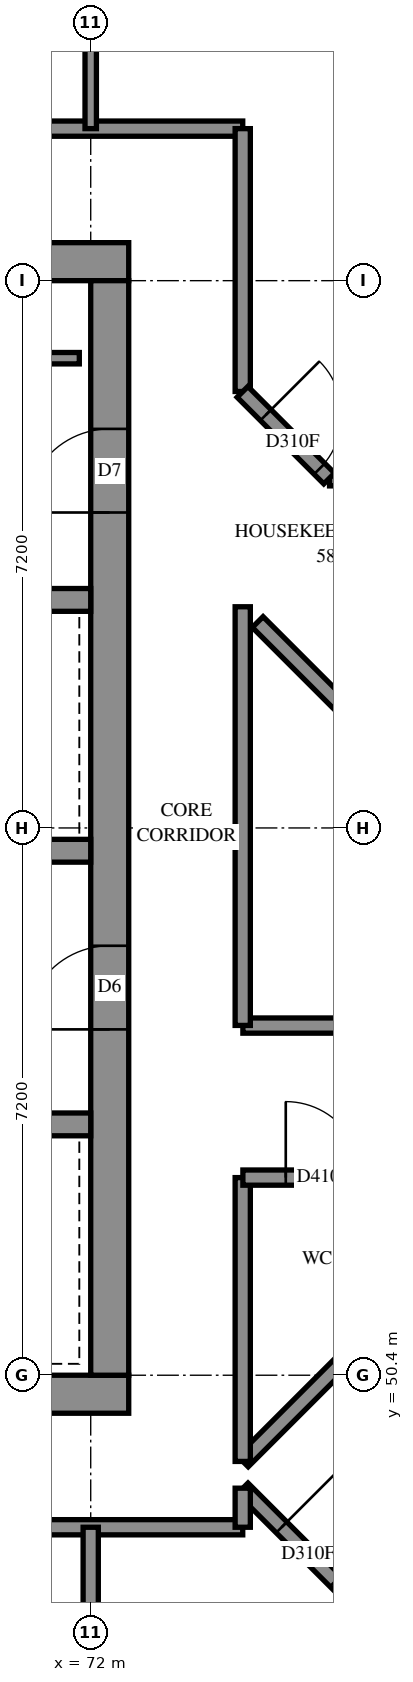
"""IFC4 building model, lengths in metres.
Left out: names, types, materials, properties, quantities, classifications, styles, units other than length and angle.
Written with IfcOpenShell. Run it as: python <this file> out.ifc"""

import sys

from ifc_helpers import new_model, si_unit, direction, frame, frame_2d, origin, place, context, subcontext, project, spatial, rectangle, extrude, element, fill, save


model = new_model("IFC4")
c1 = context("Model", 3, precision=1e-05, world=origin(), true_north=direction((0.0, 1.0)))
c2 = subcontext(c1, "Body", "Model", "MODEL_VIEW")
j1 = project(units=[si_unit("LENGTHUNIT", "METRE"), si_unit("PLANEANGLEUNIT", "RADIAN")], contexts=[c1])
p1 = place(None, origin())
s1 = spatial("IfcSite", under=j1, at=p1, CompositionType="ELEMENT")
p2 = place(p1, origin())
s2 = spatial("IfcBuilding", under=s1, at=p2, CompositionType="ELEMENT")
p3 = place(p2, frame((0.0, 0.0, 213.4)))
s3 = spatial("IfcBuildingStorey", under=s2, at=p3, CompositionType="ELEMENT", Elevation=213.4)
p4 = place(p3, frame((57.1, 50.15, -0.3), z_axis=(0.0, 0.0, 1.0), x_axis=(1.0, 0.0, 0.0)))
e1 = element("IfcWall", 1, at=p4, inside=s3, PredefinedType="SHEAR", context=c2, shape_type="SweptSolid", body=[
    extrude(rectangle(XDim=15.4, YDim=0.5, at=frame_2d((7.7, 0.0))), origin(), (0.0, 0.0, 1.0), 2.7),
])
p5 = place(p3, frame((57.1, 65.05, -0.3), z_axis=(0.0, 0.0, 1.0), x_axis=(1.0, 0.0, 0.0)))
e2 = element("IfcWall", 2, at=p5, inside=s3, PredefinedType="SHEAR", context=c2, shape_type="SweptSolid", body=[
    extrude(rectangle(XDim=15.4, YDim=0.5, at=frame_2d((7.7, 0.0))), origin(), (0.0, 0.0, 1.0), 2.7),
])
p6 = place(p5, frame((10.5, 0.0, 0.3)))
e3 = element("IfcOpeningElement", 3, at=p6, cuts=e2, PredefinedType="OPENING", context=c2, shape_type="SweptSolid", body=[
    extrude(rectangle(XDim=0.8, YDim=2.1, at=frame_2d((0.4, 1.05))), frame((0.0, 0.26, 0.0), z_axis=(0.0, -1.0, 0.0), x_axis=(1.0, 0.0, 0.0)), (0.0, 0.0, 1.0), 0.52),
])
p7 = place(p3, frame((72.25, 50.4, -0.3), z_axis=(0.0, 0.0, 1.0), x_axis=(0.0, 1.0, 0.0)))
e4 = element("IfcWall", 4, at=p7, inside=s3, PredefinedType="SHEAR", context=c2, shape_type="SweptSolid", body=[
    extrude(rectangle(XDim=14.4, YDim=0.5, at=frame_2d((7.2, 0.0))), origin(), (0.0, 0.0, 1.0), 2.7),
])
p8 = place(p7, frame((4.55, 0.0, 0.3)))
e5 = element("IfcOpeningElement", 5, at=p8, cuts=e4, PredefinedType="OPENING", context=c2, shape_type="SweptSolid", body=[
    extrude(rectangle(XDim=1.1, YDim=2.1, at=frame_2d((0.55, 1.05))), frame((0.0, 0.26, 0.0), z_axis=(0.0, -1.0, 0.0), x_axis=(1.0, 0.0, 0.0)), (0.0, 0.0, 1.0), 0.52),
])
p9 = place(p7, frame((11.35, 0.0, 0.3)))
e6 = element("IfcOpeningElement", 6, at=p9, cuts=e4, PredefinedType="OPENING", context=c2, shape_type="SweptSolid", body=[
    extrude(rectangle(XDim=1.1, YDim=2.1, at=frame_2d((0.55, 1.05))), frame((0.0, 0.26, 0.0), z_axis=(0.0, -1.0, 0.0), x_axis=(1.0, 0.0, 0.0)), (0.0, 0.0, 1.0), 0.52),
])
p10 = place(p3, frame((57.6, 53.7, 0.0), z_axis=(0.0, 0.0, 1.0), x_axis=(1.0, 0.0, 0.0)))
e7 = element("IfcWall", 7, at=p10, inside=s3, PredefinedType="SOLIDWALL", context=c2, shape_type="SweptSolid", body=[
    extrude(rectangle(XDim=14.4, YDim=0.3, at=frame_2d((7.2, 0.0))), origin(), (0.0, 0.0, 1.0), 3.1),
])
p11 = place(p10, frame((1.35, 0.0, 0.0)))
e8 = element("IfcOpeningElement", 8, at=p11, cuts=e7, PredefinedType="OPENING", context=c2, shape_type="SweptSolid", body=[
    extrude(rectangle(XDim=0.9, YDim=2.1, at=frame_2d((0.45, 1.05))), frame((0.0, 0.16, 0.0), z_axis=(0.0, -1.0, 0.0), x_axis=(1.0, 0.0, 0.0)), (0.0, 0.0, 1.0), 0.32),
])
p12 = place(p10, frame((4.95, 0.0, 0.0)))
e9 = element("IfcOpeningElement", 9, at=p12, cuts=e7, PredefinedType="OPENING", context=c2, shape_type="SweptSolid", body=[
    extrude(rectangle(XDim=0.9, YDim=2.1, at=frame_2d((0.45, 1.05))), frame((0.0, 0.16, 0.0), z_axis=(0.0, -1.0, 0.0), x_axis=(1.0, 0.0, 0.0)), (0.0, 0.0, 1.0), 0.32),
])
p13 = place(p10, frame((8.55, 0.0, 0.0)))
e10 = element("IfcOpeningElement", 10, at=p13, cuts=e7, PredefinedType="OPENING", context=c2, shape_type="SweptSolid", body=[
    extrude(rectangle(XDim=0.9, YDim=2.1, at=frame_2d((0.45, 1.05))), frame((0.0, 0.16, 0.0), z_axis=(0.0, -1.0, 0.0), x_axis=(1.0, 0.0, 0.0)), (0.0, 0.0, 1.0), 0.32),
])
p14 = place(p10, frame((12.05, 0.0, 0.0)))
e11 = element("IfcOpeningElement", 11, at=p14, cuts=e7, PredefinedType="OPENING", context=c2, shape_type="SweptSolid", body=[
    extrude(rectangle(XDim=1.1, YDim=2.1, at=frame_2d((0.55, 1.05))), frame((0.0, 0.16, 0.0), z_axis=(0.0, -1.0, 0.0), x_axis=(1.0, 0.0, 0.0)), (0.0, 0.0, 1.0), 0.32),
])
p15 = place(p3, frame((57.6, 57.3, 0.0), z_axis=(0.0, 0.0, 1.0), x_axis=(1.0, 0.0, 0.0)))
e12 = element("IfcWall", 12, at=p15, inside=s3, PredefinedType="SOLIDWALL", context=c2, shape_type="SweptSolid", body=[
    extrude(rectangle(XDim=14.4, YDim=0.3, at=frame_2d((7.2, 0.0))), origin(), (0.0, 0.0, 1.0), 3.1),
])
p16 = place(p15, frame((1.25, 0.0, 0.0)))
e13 = element("IfcOpeningElement", 13, at=p16, cuts=e12, PredefinedType="OPENING", context=c2, shape_type="SweptSolid", body=[
    extrude(rectangle(XDim=1.1, YDim=2.1, at=frame_2d((0.55, 1.05))), frame((0.0, 0.16, 0.0), z_axis=(0.0, -1.0, 0.0), x_axis=(1.0, 0.0, 0.0)), (0.0, 0.0, 1.0), 0.32),
])
p17 = place(p15, frame((4.85, 0.0, 0.0)))
e14 = element("IfcOpeningElement", 14, at=p17, cuts=e12, PredefinedType="OPENING", context=c2, shape_type="SweptSolid", body=[
    extrude(rectangle(XDim=1.1, YDim=2.1, at=frame_2d((0.55, 1.05))), frame((0.0, 0.16, 0.0), z_axis=(0.0, -1.0, 0.0), x_axis=(1.0, 0.0, 0.0)), (0.0, 0.0, 1.0), 0.32),
])
p18 = place(p15, frame((8.45, 0.0, 0.0)))
e15 = element("IfcOpeningElement", 15, at=p18, cuts=e12, PredefinedType="OPENING", context=c2, shape_type="SweptSolid", body=[
    extrude(rectangle(XDim=1.1, YDim=2.1, at=frame_2d((0.55, 1.05))), frame((0.0, 0.16, 0.0), z_axis=(0.0, -1.0, 0.0), x_axis=(1.0, 0.0, 0.0)), (0.0, 0.0, 1.0), 0.32),
])
p19 = place(p15, frame((12.05, 0.0, 0.0)))
e16 = element("IfcOpeningElement", 16, at=p19, cuts=e12, PredefinedType="OPENING", context=c2, shape_type="SweptSolid", body=[
    extrude(rectangle(XDim=1.1, YDim=2.1, at=frame_2d((0.55, 1.05))), frame((0.0, 0.16, 0.0), z_axis=(0.0, -1.0, 0.0), x_axis=(1.0, 0.0, 0.0)), (0.0, 0.0, 1.0), 0.32),
])
p20 = place(p3, frame((64.8, 60.6, 0.0), z_axis=(0.0, 0.0, 1.0), x_axis=(1.0, 0.0, 0.0)))
e17 = element("IfcWall", 17, at=p20, inside=s3, PredefinedType="SOLIDWALL", context=c2, shape_type="SweptSolid", body=[
    extrude(rectangle(XDim=7.2, YDim=0.3, at=frame_2d((3.6, 0.0))), origin(), (0.0, 0.0, 1.0), 3.1),
])
p21 = place(p3, frame((64.95, 63.78, 0.0), z_axis=(0.0, 0.0, 1.0), x_axis=(1.0, 0.0, 0.0)))
e18 = element("IfcWall", 18, at=p21, inside=s3, PredefinedType="PARTITIONING", context=c2, shape_type="SweptSolid", body=[
    extrude(rectangle(XDim=6.9, YDim=0.15, at=frame_2d((3.45, 0.0))), origin(), (0.0, 0.0, 1.0), 3.1),
])
p22 = place(p3, frame((55.6, 48.4, 0.0), z_axis=(0.0, 0.0, 1.0), x_axis=(1.0, 0.0, 0.0)))
e19 = element("IfcWall", 19, at=p22, inside=s3, PredefinedType="PARTITIONING", context=c2, shape_type="SweptSolid", body=[
    extrude(rectangle(XDim=18.4, YDim=0.2, at=frame_2d((9.2, 0.0))), origin(), (0.0, 0.0, 1.0), 3.1),
])
p23 = place(p22, frame((5.862, 0.0, 0.0)))
e20 = element("IfcOpeningElement", 20, at=p23, cuts=e19, PredefinedType="OPENING", context=c2, shape_type="SweptSolid", body=[
    extrude(rectangle(XDim=1.0, YDim=2.1, at=frame_2d((0.5, 1.05))), frame((0.0, 0.11, 0.0), z_axis=(0.0, -1.0, 0.0), x_axis=(1.0, 0.0, 0.0)), (0.0, 0.0, 1.0), 0.22),
])
p24 = place(p22, frame((13.099, 0.0, 0.0)))
e21 = element("IfcOpeningElement", 21, at=p24, cuts=e19, PredefinedType="OPENING", context=c2, shape_type="SweptSolid", body=[
    extrude(rectangle(XDim=0.9, YDim=2.1, at=frame_2d((0.45, 1.05))), frame((0.0, 0.11, 0.0), z_axis=(0.0, -1.0, 0.0), x_axis=(1.0, 0.0, 0.0)), (0.0, 0.0, 1.0), 0.22),
])
p25 = place(p3, frame((55.6, 66.8, 0.0), z_axis=(0.0, 0.0, 1.0), x_axis=(1.0, 0.0, 0.0)))
e22 = element("IfcWall", 22, at=p25, inside=s3, PredefinedType="PARTITIONING", context=c2, shape_type="SweptSolid", body=[
    extrude(rectangle(XDim=18.4, YDim=0.2, at=frame_2d((9.2, 0.0))), origin(), (0.0, 0.0, 1.0), 3.1),
])
p26 = place(p25, frame((4.25, 0.0, 0.0)))
e23 = element("IfcOpeningElement", 23, at=p26, cuts=e22, PredefinedType="OPENING", context=c2, shape_type="SweptSolid", body=[
    extrude(rectangle(XDim=0.9, YDim=2.1, at=frame_2d((0.45, 1.05))), frame((0.0, 0.11, 0.0), z_axis=(0.0, -1.0, 0.0), x_axis=(1.0, 0.0, 0.0)), (0.0, 0.0, 1.0), 0.22),
])
p27 = place(p25, frame((7.974, 0.0, 0.0)))
e24 = element("IfcOpeningElement", 24, at=p27, cuts=e22, PredefinedType="OPENING", context=c2, shape_type="SweptSolid", body=[
    extrude(rectangle(XDim=1.0, YDim=2.1, at=frame_2d((0.5, 1.05))), frame((0.0, 0.11, 0.0), z_axis=(0.0, -1.0, 0.0), x_axis=(1.0, 0.0, 0.0)), (0.0, 0.0, 1.0), 0.22),
])
p28 = place(p25, frame((13.2, 0.0, 0.0)))
e25 = element("IfcOpeningElement", 25, at=p28, cuts=e22, PredefinedType="OPENING", context=c2, shape_type="SweptSolid", body=[
    extrude(rectangle(XDim=0.9, YDim=2.1, at=frame_2d((0.45, 1.05))), frame((0.0, 0.11, 0.0), z_axis=(0.0, -1.0, 0.0), x_axis=(1.0, 0.0, 0.0)), (0.0, 0.0, 1.0), 0.22),
])
p29 = place(p3, frame((73.999, 48.911, 0.0), z_axis=(0.0, 0.0, 1.0), x_axis=(0.7071067812, -0.7071067812, 0.0)))
e26 = element("IfcWall", 26, at=p29, inside=s3, PredefinedType="PARTITIONING", context=c2, shape_type="SweptSolid", body=[
    extrude(rectangle(XDim=5.745, YDim=0.2, at=frame_2d((2.872, 0.0))), origin(), (0.0, 0.0, 1.0), 3.1),
])
p30 = place(p29, frame((0.724, 0.0, 0.0)))
e27 = element("IfcOpeningElement", 27, at=p30, cuts=e26, PredefinedType="OPENING", context=c2, shape_type="SweptSolid", body=[
    extrude(rectangle(XDim=1.0, YDim=2.1, at=frame_2d((0.5, 1.05))), frame((0.0, 0.11, 0.0), z_axis=(0.0, -1.0, 0.0), x_axis=(1.0, 0.0, 0.0)), (0.0, 0.0, 1.0), 0.22),
])
p31 = place(p3, frame((74.002, 55.0, 0.0), z_axis=(0.0, 0.0, 1.0), x_axis=(1.0, 0.0, 0.0)))
e28 = element("IfcWall", 28, at=p31, inside=s3, PredefinedType="PARTITIONING", context=c2, shape_type="SweptSolid", body=[
    extrude(rectangle(XDim=5.508, YDim=0.2, at=frame_2d((2.754, 0.0))), origin(), (0.0, 0.0, 1.0), 3.1),
])
p32 = place(p31, frame((1.51, 0.0, 0.0)))
e29 = element("IfcOpeningElement", 29, at=p32, cuts=e28, PredefinedType="OPENING", context=c2, shape_type="SweptSolid", body=[
    extrude(rectangle(XDim=1.0, YDim=2.1, at=frame_2d((0.5, 1.05))), frame((0.0, 0.11, 0.0), z_axis=(0.0, -1.0, 0.0), x_axis=(1.0, 0.0, 0.0)), (0.0, 0.0, 1.0), 0.22),
])
p33 = place(p3, frame((74.0, 55.002, 0.0), z_axis=(0.0, 0.0, 1.0), x_axis=(0.0, 1.0, 0.0)))
e30 = element("IfcWall", 30, at=p33, inside=s3, PredefinedType="PARTITIONING", context=c2, shape_type="SweptSolid", body=[
    extrude(rectangle(XDim=5.508, YDim=0.2, at=frame_2d((2.754, 0.0))), origin(), (0.0, 0.0, 1.0), 3.1),
])
p34 = place(p3, frame((74.001, 49.267, 0.0), z_axis=(0.0, 0.0, 1.0), x_axis=(0.7071067812, 0.7071067812, 0.0)))
e31 = element("IfcWall", 31, at=p34, inside=s3, PredefinedType="PARTITIONING", context=c2, shape_type="SweptSolid", body=[
    extrude(rectangle(XDim=5.278, YDim=0.2, at=frame_2d((2.639, 0.0))), origin(), (0.0, 0.0, 1.0), 3.1),
])
p35 = place(p3, frame((72.0, 43.6, 0.0), z_axis=(0.0, 0.0, 1.0), x_axis=(0.0, 1.0, 0.0)))
e32 = element("IfcWall", 32, at=p35, inside=s3, PredefinedType="PARTITIONING", context=c2, shape_type="SweptSolid", body=[
    extrude(rectangle(XDim=4.8, YDim=0.2, at=frame_2d((2.4, 0.0))), origin(), (0.0, 0.0, 1.0), 3.1),
])
p36 = place(p3, frame((74.197, 60.309, 0.0), z_axis=(0.0, 0.0, 1.0), x_axis=(0.7071067812, -0.7071067812, 0.0)))
e33 = element("IfcWall", 33, at=p36, inside=s3, PredefinedType="PARTITIONING", context=c2, shape_type="SweptSolid", body=[
    extrude(rectangle(XDim=4.738, YDim=0.2, at=frame_2d((2.369, 0.0))), origin(), (0.0, 0.0, 1.0), 3.1),
])
p37 = place(p3, frame((75.142, 62.2, 0.0), z_axis=(0.0, 0.0, 1.0), x_axis=(1.0, 0.0, 0.0)))
e34 = element("IfcWall", 34, at=p37, inside=s3, PredefinedType="PARTITIONING", context=c2, shape_type="SweptSolid", body=[
    extrude(rectangle(XDim=4.058, YDim=0.2, at=frame_2d((2.029, 0.0))), origin(), (0.0, 0.0, 1.0), 3.1),
])
p38 = place(p37, frame((2.808, 0.0, 0.0)))
e35 = element("IfcOpeningElement", 35, at=p38, cuts=e34, PredefinedType="OPENING", context=c2, shape_type="SweptSolid", body=[
    extrude(rectangle(XDim=0.9, YDim=2.1, at=frame_2d((0.45, 1.05))), frame((0.0, 0.11, 0.0), z_axis=(0.0, -1.0, 0.0), x_axis=(1.0, 0.0, 0.0)), (0.0, 0.0, 1.0), 0.22),
])
p39 = place(p3, frame((74.0, 49.266, 0.0), z_axis=(0.0, 0.0, 1.0), x_axis=(0.0, 1.0, 0.0)))
e36 = element("IfcWall", 36, at=p39, inside=s3, PredefinedType="PARTITIONING", context=c2, shape_type="SweptSolid", body=[
    extrude(rectangle(XDim=3.734, YDim=0.2, at=frame_2d((1.867, 0.0))), origin(), (0.0, 0.0, 1.0), 3.1),
])
p40 = place(p3, frame((74.002, 53.0, 0.0), z_axis=(0.0, 0.0, 1.0), x_axis=(1.0, 0.0, 0.0)))
e37 = element("IfcWall", 37, at=p40, inside=s3, PredefinedType="PARTITIONING", context=c2, shape_type="SweptSolid", body=[
    extrude(rectangle(XDim=3.732, YDim=0.2, at=frame_2d((1.866, 0.0))), origin(), (0.0, 0.0, 1.0), 3.1),
])
p41 = place(p40, frame((0.564, 0.0, 0.0)))
e38 = element("IfcOpeningElement", 38, at=p41, cuts=e37, PredefinedType="OPENING", context=c2, shape_type="SweptSolid", body=[
    extrude(rectangle(XDim=1.0, YDim=2.1, at=frame_2d((0.5, 1.05))), frame((0.0, 0.11, 0.0), z_axis=(0.0, -1.0, 0.0), x_axis=(1.0, 0.0, 0.0)), (0.0, 0.0, 1.0), 0.22),
])
p42 = place(p3, frame((74.0, 63.342, 0.0), z_axis=(0.0, 0.0, 1.0), x_axis=(0.0, 1.0, 0.0)))
e39 = element("IfcWall", 39, at=p42, inside=s3, PredefinedType="PARTITIONING", context=c2, shape_type="SweptSolid", body=[
    extrude(rectangle(XDim=3.458, YDim=0.2, at=frame_2d((1.729, 0.0))), origin(), (0.0, 0.0, 1.0), 3.1),
])
p43 = place(p3, frame((72.0, 66.8, 0.0), z_axis=(0.0, 0.0, 1.0), x_axis=(0.0, 1.0, 0.0)))
e40 = element("IfcWall", 40, at=p43, inside=s3, PredefinedType="PARTITIONING", context=c2, shape_type="SweptSolid", body=[
    extrude(rectangle(XDim=2.4, YDim=0.15, at=frame_2d((1.2, 0.0))), origin(), (0.0, 0.0, 1.0), 3.1),
])
p44 = place(p3, frame((73.997, 63.337, 0.0), z_axis=(0.0, 0.0, 1.0), x_axis=(0.7071067812, -0.7071067812, 0.0)))
e41 = element("IfcWall", 41, at=p44, inside=s3, PredefinedType="PARTITIONING", context=c2, shape_type="SweptSolid", body=[
    extrude(rectangle(XDim=1.612, YDim=0.2, at=frame_2d((0.806, 0.0))), origin(), (0.0, 0.0, 1.0), 3.1),
])
p45 = place(p44, frame((0.432, 0.0, 0.0)))
e42 = element("IfcOpeningElement", 42, at=p45, cuts=e41, PredefinedType="OPENING", context=c2, shape_type="SweptSolid", body=[
    extrude(rectangle(XDim=1.0, YDim=2.1, at=frame_2d((0.5, 1.05))), frame((0.0, 0.11, 0.0), z_axis=(0.0, -1.0, 0.0), x_axis=(1.0, 0.0, 0.0)), (0.0, 0.0, 1.0), 0.22),
])
p46 = place(p3, frame((74.0, 48.4, 0.0), z_axis=(0.0, 0.0, 1.0), x_axis=(0.0, 1.0, 0.0)))
e43 = element("IfcWall", 43, at=p46, inside=s3, PredefinedType="PARTITIONING", context=c2, shape_type="SweptSolid", body=[
    extrude(rectangle(XDim=0.514, YDim=0.2, at=frame_2d((0.257, 0.0))), origin(), (0.0, 0.0, 1.0), 3.1),
])
p47 = place(p8, origin())
e44 = element("IfcDoor", 44, at=p47, inside=s3, OperationType="DOUBLE_DOOR_SINGLE_SWING", PredefinedType="DOOR", context=c2, shape_type="SweptSolid", body=[
    extrude(rectangle(XDim=1.1, YDim=2.1, at=frame_2d((0.55, 1.05))), frame((0.0, 0.025, 0.0), z_axis=(0.0, -1.0, 0.0), x_axis=(1.0, 0.0, 0.0)), (0.0, 0.0, 1.0), 0.05),
])
fill(e5, e44)
p48 = place(p9, origin())
e45 = element("IfcDoor", 45, at=p48, inside=s3, OperationType="SINGLE_SWING_RIGHT", PredefinedType="DOOR", context=c2, shape_type="SweptSolid", body=[
    extrude(rectangle(XDim=1.1, YDim=2.1, at=frame_2d((0.55, 1.05))), frame((0.0, 0.025, 0.0), z_axis=(0.0, -1.0, 0.0), x_axis=(1.0, 0.0, 0.0)), (0.0, 0.0, 1.0), 0.05),
])
fill(e6, e45)
p49 = place(p41, origin())
e46 = element("IfcDoor", 46, at=p49, inside=s3, OperationType="SINGLE_SWING_RIGHT", PredefinedType="DOOR", context=c2, shape_type="SweptSolid", body=[
    extrude(rectangle(XDim=1.0, YDim=2.1, at=frame_2d((0.5, 1.05))), frame((0.0, 0.025, 0.0), z_axis=(0.0, -1.0, 0.0), x_axis=(1.0, 0.0, 0.0)), (0.0, 0.0, 1.0), 0.05),
])
fill(e38, e46)
p50 = place(p45, origin())
e47 = element("IfcDoor", 47, at=p50, inside=s3, OperationType="SINGLE_SWING_RIGHT", PredefinedType="DOOR", context=c2, shape_type="SweptSolid", body=[
    extrude(rectangle(XDim=1.0, YDim=2.1, at=frame_2d((0.5, 1.05))), frame((0.0, 0.025, 0.0), z_axis=(0.0, -1.0, 0.0), x_axis=(1.0, 0.0, 0.0)), (0.0, 0.0, 1.0), 0.05),
])
fill(e42, e47)
p51 = place(p30, origin())
e48 = element("IfcDoor", 48, at=p51, inside=s3, OperationType="SINGLE_SWING_LEFT", PredefinedType="DOOR", context=c2, shape_type="SweptSolid", body=[
    extrude(rectangle(XDim=1.0, YDim=2.1, at=frame_2d((0.5, 1.05))), frame((0.0, 0.025, 0.0), z_axis=(0.0, -1.0, 0.0), x_axis=(1.0, 0.0, 0.0)), (0.0, 0.0, 1.0), 0.05),
])
fill(e27, e48)
save(model, sys.argv[1])
